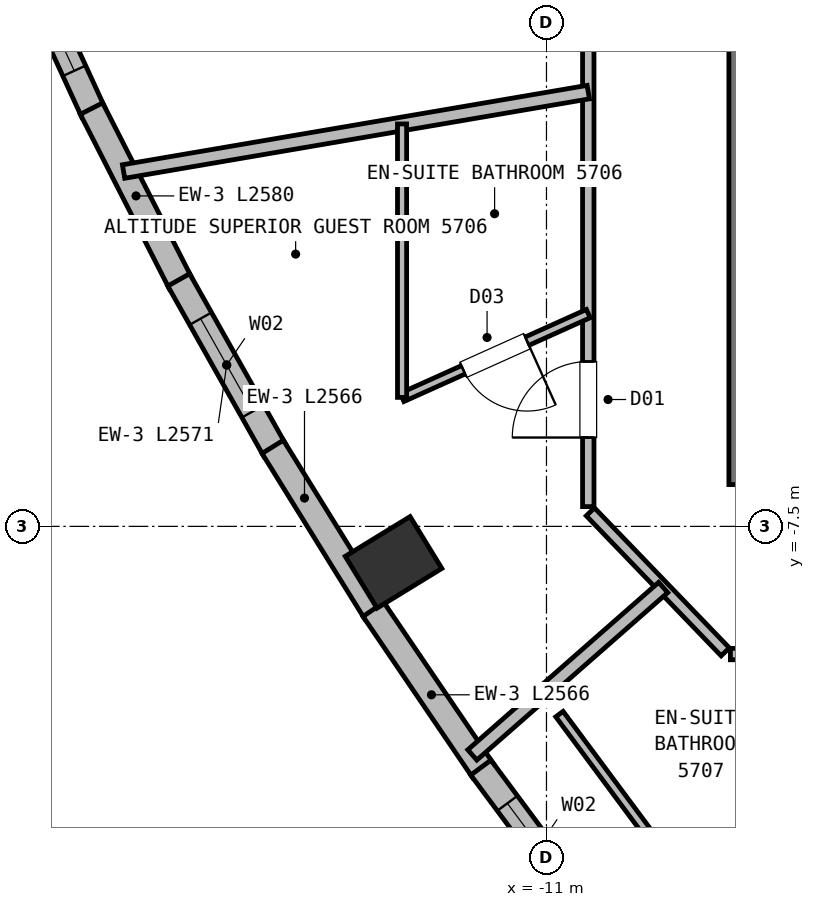
"""IFC4 building model, lengths in metres.
Left out: names, types, materials, properties, quantities, classifications, styles, units other than length and angle.
Written with IfcOpenShell. Run it as: python <this file> out.ifc"""

import sys

from ifc_helpers import new_model, si_unit, direction, frame, frame_2d, origin, origin_2d, place, context, subcontext, project, spatial, rectangle, extrude, element, fill, save


model = new_model("IFC4")
c1 = context("Model", 3, precision=1e-05, world=origin(), true_north=direction((0.0, 1.0)))
c2 = subcontext(c1, "Body", "Model", "MODEL_VIEW")
j1 = project(units=[si_unit("LENGTHUNIT", "METRE"), si_unit("PLANEANGLEUNIT", "RADIAN")], contexts=[c1])
p1 = place(None, origin())
s1 = spatial("IfcSite", under=j1, at=p1, CompositionType="ELEMENT")
p2 = place(p1, origin())
s2 = spatial("IfcBuilding", under=s1, at=p2, CompositionType="ELEMENT")
p3 = place(p2, frame((0.0, 0.0, 216.95)))
s3 = spatial("IfcBuildingStorey", under=s2, at=p3, CompositionType="ELEMENT", Elevation=216.95)
p4 = place(p3, frame((-8.35, -6.95, 0.0), z_axis=(0.0, 0.0, 1.0), x_axis=(0.0, 1.0, 0.0)))
e1 = element("IfcWall", 1, at=p4, inside=s3, PredefinedType="SHEAR", context=c2, shape_type="SweptSolid", body=[
    extrude(rectangle(XDim=8.1, YDim=0.5, at=frame_2d((4.05, 0.0))), origin(), (0.0, 0.0, 1.0), 3.55),
])
p5 = place(p3, frame((-13.012, -7.974, 0.0), z_axis=(0.0, 0.0, 1.0), x_axis=(-0.522498564716, 0.852640164354, 0.0)))
e2 = element("IfcColumn", 2, at=p5, inside=s3, PredefinedType="COLUMN", context=c2, shape_type="SweptSolid", body=[
    extrude(rectangle(XDim=0.8, YDim=1.0, at=origin_2d()), origin(), (0.0, 0.0, 1.0), 3.8),
])
p6 = place(p3, frame((-16.964, -2.048, 0.0), z_axis=(0.0, 0.0, 1.0), x_axis=(-0.41697893771, 0.908916148776, 0.0)))
e3 = element("IfcWall", 3, at=p6, inside=s3, PredefinedType="SOLIDWALL", context=c2, shape_type="SweptSolid", body=[
    extrude(rectangle(XDim=2.593, YDim=0.33, at=frame_2d((1.296, 0.0))), origin(), (0.0, 0.0, 1.0), 3.55),
])
p7 = place(p6, frame((0.596, 0.0, 0.72)))
e4 = element("IfcOpeningElement", 4, at=p7, cuts=e3, PredefinedType="OPENING", context=c2, shape_type="SweptSolid", body=[
    extrude(rectangle(XDim=1.4, YDim=1.84, at=frame_2d((0.7, 0.92))), frame((0.0, 0.175, 0.0), z_axis=(0.0, -1.0, 0.0), x_axis=(1.0, 0.0, 0.0)), (0.0, 0.0, 1.0), 0.35),
])
p8 = place(p3, frame((-15.814, -4.301, 0.0), z_axis=(0.0, 0.0, 1.0), x_axis=(-0.454203650024, 0.890897886576, 0.0)))
e5 = element("IfcWall", 5, at=p8, inside=s3, PredefinedType="SOLIDWALL", context=c2, shape_type="SweptSolid", body=[
    extrude(rectangle(XDim=2.58, YDim=0.33, at=frame_2d((1.29, 0.0))), origin(), (0.0, 0.0, 1.0), 3.55),
])
p9 = place(p3, frame((-14.576, -6.496, 0.0), z_axis=(0.0, 0.0, 1.0), x_axis=(-0.490851857412, 0.871243051091, 0.0)))
e6 = element("IfcWall", 6, at=p9, inside=s3, PredefinedType="SOLIDWALL", context=c2, shape_type="SweptSolid", body=[
    extrude(rectangle(XDim=2.571, YDim=0.33, at=frame_2d((1.285, 0.0))), origin(), (0.0, 0.0, 1.0), 3.55),
])
p10 = place(p9, frame((0.585, 0.0, 0.72)))
e7 = element("IfcOpeningElement", 7, at=p10, cuts=e6, PredefinedType="OPENING", context=c2, shape_type="SweptSolid", body=[
    extrude(rectangle(XDim=1.4, YDim=1.84, at=frame_2d((0.7, 0.92))), frame((0.0, 0.175, 0.0), z_axis=(0.0, -1.0, 0.0), x_axis=(1.0, 0.0, 0.0)), (0.0, 0.0, 1.0), 0.35),
])
p11 = place(p3, frame((-13.25, -8.634, 0.0), z_axis=(0.0, 0.0, 1.0), x_axis=(-0.526908054593, 0.849922291745, 0.0)))
e8 = element("IfcWall", 8, at=p11, inside=s3, PredefinedType="SOLIDWALL", context=c2, shape_type="SweptSolid", body=[
    extrude(rectangle(XDim=2.566, YDim=0.33, at=frame_2d((1.283, 0.0))), origin(), (0.0, 0.0, 1.0), 3.55),
])
p12 = place(p3, frame((-11.834, -10.715, 0.0), z_axis=(0.0, 0.0, 1.0), x_axis=(-0.562164288669, 0.827025581554, 0.0)))
e9 = element("IfcWall", 9, at=p12, inside=s3, PredefinedType="SOLIDWALL", context=c2, shape_type="SweptSolid", body=[
    extrude(rectangle(XDim=2.566, YDim=0.33, at=frame_2d((1.283, 0.0))), origin(), (0.0, 0.0, 1.0), 3.55),
])
p13 = place(p3, frame((-10.331, -12.738, 0.0), z_axis=(0.0, 0.0, 1.0), x_axis=(-0.596178851143, 0.802851653451, 0.0)))
e10 = element("IfcWall", 10, at=p13, inside=s3, PredefinedType="SOLIDWALL", context=c2, shape_type="SweptSolid", body=[
    extrude(rectangle(XDim=2.571, YDim=0.33, at=frame_2d((1.285, 0.0))), origin(), (0.0, 0.0, 1.0), 3.55),
])
p14 = place(p13, frame((0.585, 0.0, 0.72)))
e11 = element("IfcOpeningElement", 11, at=p14, cuts=e10, PredefinedType="OPENING", context=c2, shape_type="SweptSolid", body=[
    extrude(rectangle(XDim=1.4, YDim=1.84, at=frame_2d((0.7, 0.92))), frame((0.0, 0.175, 0.0), z_axis=(0.0, -1.0, 0.0), x_axis=(1.0, 0.0, 0.0)), (0.0, 0.0, 1.0), 0.35),
])
p15 = place(p3, frame((8.58, -9.18, 0.0), z_axis=(0.0, 0.0, 1.0), x_axis=(-1.0, 0.0, 0.0)))
e12 = element("IfcWall", 12, at=p15, inside=s3, PredefinedType="PARTITIONING", context=c2, shape_type="SweptSolid", body=[
    extrude(rectangle(XDim=17.16, YDim=0.15, at=frame_2d((8.58, 0.0))), origin(), (0.0, 0.0, 1.0), 3.23),
])
p16 = place(p15, frame((3.916, 0.0, 0.0)))
e13 = element("IfcOpeningElement", 13, at=p16, cuts=e12, PredefinedType="OPENING", context=c2, shape_type="SweptSolid", body=[
    extrude(rectangle(XDim=0.95, YDim=2.1, at=frame_2d((0.475, 1.05))), frame((0.0, 0.085, 0.0), z_axis=(0.0, -1.0, 0.0), x_axis=(1.0, 0.0, 0.0)), (0.0, 0.0, 1.0), 0.17),
])
p17 = place(p15, frame((1.363, 0.0, 0.0)))
e14 = element("IfcOpeningElement", 14, at=p17, cuts=e12, PredefinedType="OPENING", context=c2, shape_type="SweptSolid", body=[
    extrude(rectangle(XDim=1.0, YDim=2.15, at=frame_2d((0.5, 1.075))), frame((0.0, 0.085, 0.0), z_axis=(0.0, -1.0, 0.0), x_axis=(1.0, 0.0, 0.0)), (0.0, 0.0, 1.0), 0.17),
])
p18 = place(p15, frame((12.038, 0.0, 0.0)))
e15 = element("IfcOpeningElement", 15, at=p18, cuts=e12, PredefinedType="OPENING", context=c2, shape_type="SweptSolid", body=[
    extrude(rectangle(XDim=1.06, YDim=2.15, at=frame_2d((0.53, 1.075))), frame((0.0, 0.085, 0.0), z_axis=(0.0, -1.0, 0.0), x_axis=(1.0, 0.0, 0.0)), (0.0, 0.0, 1.0), 0.17),
])
p19 = place(p15, frame((6.251, 0.0, 0.0)))
e16 = element("IfcOpeningElement", 16, at=p19, cuts=e12, PredefinedType="OPENING", context=c2, shape_type="SweptSolid", body=[
    extrude(rectangle(XDim=1.06, YDim=2.15, at=frame_2d((0.53, 1.075))), frame((0.0, 0.085, 0.0), z_axis=(0.0, -1.0, 0.0), x_axis=(1.0, 0.0, 0.0)), (0.0, 0.0, 1.0), 0.17),
])
p20 = place(p3, frame((-10.45, -7.24, 0.0), z_axis=(0.0, 0.0, 1.0), x_axis=(0.0, 1.0, 0.0)))
e17 = element("IfcWall", 17, at=p20, inside=s3, PredefinedType="PARTITIONING", context=c2, shape_type="SweptSolid", body=[
    extrude(rectangle(XDim=14.48, YDim=0.15, at=frame_2d((7.24, 0.0))), origin(), (0.0, 0.0, 1.0), 3.23),
])
p21 = place(p20, frame((0.909, 0.0, 0.0)))
e18 = element("IfcOpeningElement", 18, at=p21, cuts=e17, PredefinedType="OPENING", context=c2, shape_type="SweptSolid", body=[
    extrude(rectangle(XDim=1.0, YDim=2.15, at=frame_2d((0.5, 1.075))), frame((0.0, 0.085, 0.0), z_axis=(0.0, -1.0, 0.0), x_axis=(1.0, 0.0, 0.0)), (0.0, 0.0, 1.0), 0.17),
])
p22 = place(p20, frame((6.593, 0.0, 0.0)))
e19 = element("IfcOpeningElement", 19, at=p22, cuts=e17, PredefinedType="OPENING", context=c2, shape_type="SweptSolid", body=[
    extrude(rectangle(XDim=1.06, YDim=2.15, at=frame_2d((0.53, 1.075))), frame((0.0, 0.085, 0.0), z_axis=(0.0, -1.0, 0.0), x_axis=(1.0, 0.0, 0.0)), (0.0, 0.0, 1.0), 0.17),
])
p23 = place(p20, frame((12.49, 0.0, 0.0)))
e20 = element("IfcOpeningElement", 20, at=p23, cuts=e17, PredefinedType="OPENING", context=c2, shape_type="SweptSolid", body=[
    extrude(rectangle(XDim=1.06, YDim=2.15, at=frame_2d((0.53, 1.075))), frame((0.0, 0.085, 0.0), z_axis=(0.0, -1.0, 0.0), x_axis=(1.0, 0.0, 0.0)), (0.0, 0.0, 1.0), 0.17),
])
p24 = place(p3, frame((-8.648, -9.151, 0.0), z_axis=(0.0, 0.0, 1.0), x_axis=(-0.693764562202, 0.720201869085, 0.0)))
e21 = element("IfcWall", 21, at=p24, inside=s3, PredefinedType="PARTITIONING", context=c2, shape_type="SweptSolid", body=[
    extrude(rectangle(XDim=2.558, YDim=0.15, at=frame_2d((1.279, 0.0))), origin(), (0.0, 0.0, 1.0), 3.23),
])
p25 = place(p3, frame((-10.45, -1.786, 0.0), z_axis=(0.0, 0.0, 1.0), x_axis=(-0.985707903362, -0.168463435946, 0.0)))
e22 = element("IfcWall", 22, at=p25, inside=s3, PredefinedType="PARTITIONING", context=c2, shape_type="SweptSolid", body=[
    extrude(rectangle(XDim=6.203, YDim=0.18, at=frame_2d((3.101, 0.0))), origin(), (0.0, 0.0, 1.0), 3.55),
])
p26 = place(p3, frame((-10.45, -4.7, 0.0), z_axis=(0.0, 0.0, 1.0), x_axis=(-0.911981011606, -0.410232415186, 0.0)))
e23 = element("IfcWall", 23, at=p26, inside=s3, PredefinedType="PARTITIONING", context=c2, shape_type="SweptSolid", body=[
    extrude(rectangle(XDim=2.687, YDim=0.12, at=frame_2d((1.343, 0.0))), origin(), (0.0, 0.0, 1.0), 3.55),
])
p27 = place(p26, frame((0.883, 0.0, 0.0)))
e24 = element("IfcOpeningElement", 24, at=p27, cuts=e23, PredefinedType="OPENING", context=c2, shape_type="SweptSolid", body=[
    extrude(rectangle(XDim=0.92, YDim=2.1, at=frame_2d((0.46, 1.05))), frame((0.0, 0.07, 0.0), z_axis=(0.0, -1.0, 0.0), x_axis=(1.0, 0.0, 0.0)), (0.0, 0.0, 1.0), 0.14),
])
p28 = place(p3, frame((-12.9, -2.205, 0.0), z_axis=(0.0, 0.0, 1.0), x_axis=(0.0, -1.0, 0.0)))
e25 = element("IfcWall", 25, at=p28, inside=s3, PredefinedType="PARTITIONING", context=c2, shape_type="SweptSolid", body=[
    extrude(rectangle(XDim=3.598, YDim=0.12, at=frame_2d((1.799, 0.0))), origin(), (0.0, 0.0, 1.0), 3.23),
])
p29 = place(p3, frame((-9.464, -8.304, 0.0), z_axis=(0.0, 0.0, 1.0), x_axis=(-0.751711445712, -0.659492154909, 0.0)))
e26 = element("IfcWall", 26, at=p29, inside=s3, PredefinedType="PARTITIONING", context=c2, shape_type="SweptSolid", body=[
    extrude(rectangle(XDim=3.341, YDim=0.18, at=frame_2d((1.67, 0.0))), origin(), (0.0, 0.0, 1.0), 3.55),
])
p30 = place(p3, frame((-10.829, -9.97, 0.0), z_axis=(0.0, 0.0, 1.0), x_axis=(0.596291397786, -0.802768066708, 0.0)))
e27 = element("IfcWall", 27, at=p30, inside=s3, PredefinedType="PARTITIONING", context=c2, shape_type="SweptSolid", body=[
    extrude(rectangle(XDim=2.068, YDim=0.12, at=frame_2d((1.034, 0.0))), origin(), (0.0, 0.0, 1.0), 2.98),
])
p31 = place(p7, origin())
e28 = element("IfcWindow", 28, at=p31, inside=s3, PartitioningType="SINGLE_PANEL", PredefinedType="WINDOW", context=c2, shape_type="SweptSolid", body=[
    extrude(rectangle(XDim=1.4, YDim=1.84, at=frame_2d((0.7, 0.92))), frame((0.0, 0.03, 0.0), z_axis=(0.0, -1.0, 0.0), x_axis=(1.0, 0.0, 0.0)), (0.0, 0.0, 1.0), 0.06),
])
fill(e4, e28)
p32 = place(p10, origin())
e29 = element("IfcWindow", 29, at=p32, inside=s3, PartitioningType="SINGLE_PANEL", PredefinedType="WINDOW", context=c2, shape_type="SweptSolid", body=[
    extrude(rectangle(XDim=1.4, YDim=1.84, at=frame_2d((0.7, 0.92))), frame((0.0, 0.03, 0.0), z_axis=(0.0, -1.0, 0.0), x_axis=(1.0, 0.0, 0.0)), (0.0, 0.0, 1.0), 0.06),
])
fill(e7, e29)
p33 = place(p14, origin())
e30 = element("IfcWindow", 30, at=p33, inside=s3, PartitioningType="SINGLE_PANEL", PredefinedType="WINDOW", context=c2, shape_type="SweptSolid", body=[
    extrude(rectangle(XDim=1.4, YDim=1.84, at=frame_2d((0.7, 0.92))), frame((0.0, 0.03, 0.0), z_axis=(0.0, -1.0, 0.0), x_axis=(1.0, 0.0, 0.0)), (0.0, 0.0, 1.0), 0.06),
])
fill(e11, e30)
p34 = place(p27, origin())
e31 = element("IfcDoor", 31, at=p34, inside=s3, OperationType="SINGLE_SWING_LEFT", PredefinedType="DOOR", context=c2, shape_type="SweptSolid", body=[
    extrude(rectangle(XDim=0.92, YDim=2.1, at=frame_2d((0.46, 1.05))), frame((0.0, 0.025, 0.0), z_axis=(0.0, -1.0, 0.0), x_axis=(1.0, 0.0, 0.0)), (0.0, 0.0, 1.0), 0.05),
])
fill(e24, e31)
p35 = place(p21, origin())
e32 = element("IfcDoor", 32, at=p35, inside=s3, OperationType="SINGLE_SWING_LEFT", PredefinedType="DOOR", context=c2, shape_type="SweptSolid", body=[
    extrude(rectangle(XDim=1.0, YDim=2.15, at=frame_2d((0.5, 1.075))), frame((0.0, 0.025, 0.0), z_axis=(0.0, -1.0, 0.0), x_axis=(1.0, 0.0, 0.0)), (0.0, 0.0, 1.0), 0.05),
])
fill(e18, e32)
save(model, sys.argv[1])
